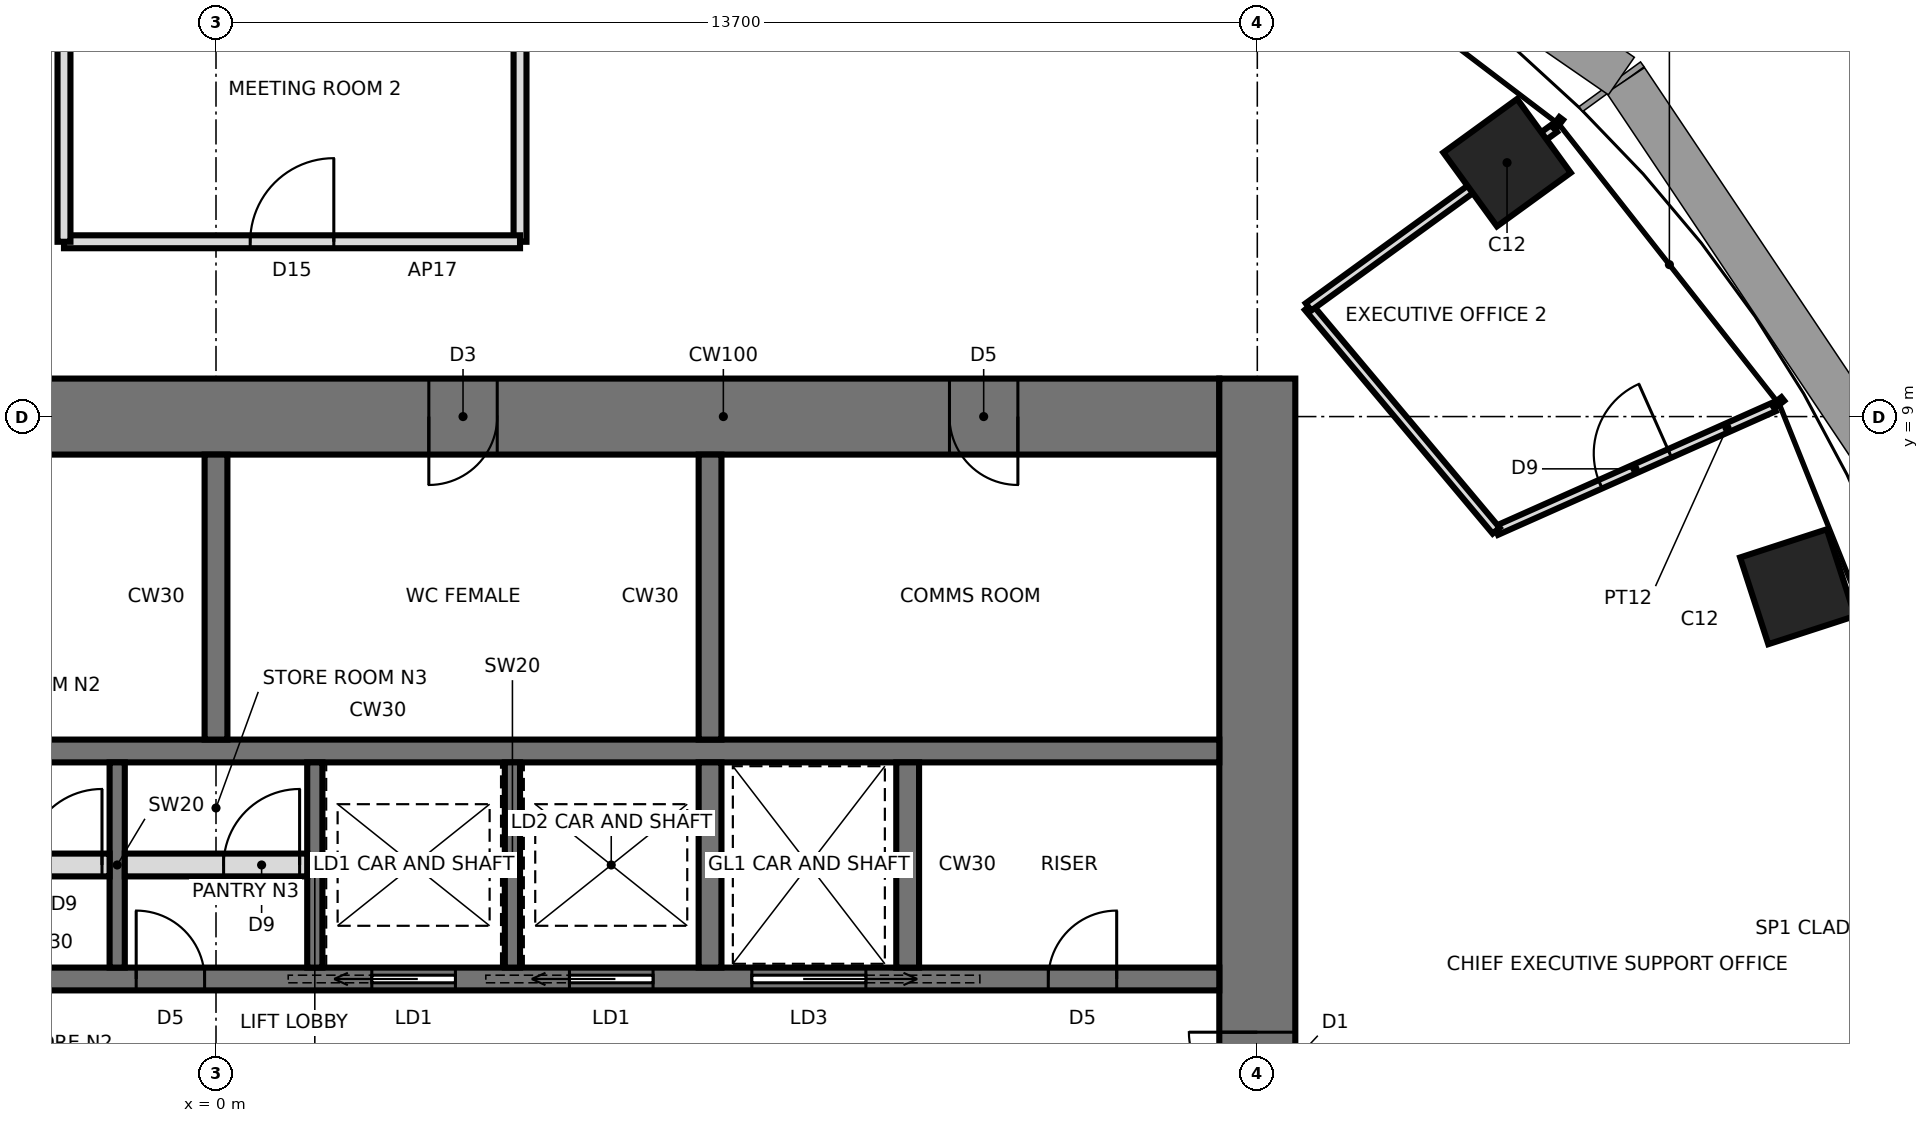
"""IFC4 building model, lengths in metres.
Left out: names, types, materials, properties, quantities, classifications, styles, units other than length and angle.
Written with IfcOpenShell. Run it as: python <this file> out.ifc"""

import sys

from ifc_helpers import new_model, si_unit, direction, frame, frame_2d, origin, origin_2d, place, context, subcontext, project, spatial, rectangle, extrude, element, fill, save


model = new_model("IFC4")
c1 = context("Model", 3, precision=1e-05, world=origin(), true_north=direction((0.0, 1.0)))
c2 = subcontext(c1, "Body", "Model", "MODEL_VIEW")
j1 = project(units=[si_unit("LENGTHUNIT", "METRE"), si_unit("PLANEANGLEUNIT", "RADIAN")], contexts=[c1])
p1 = place(None, origin())
s1 = spatial("IfcSite", under=j1, at=p1, CompositionType="ELEMENT")
p2 = place(p1, origin())
s2 = spatial("IfcBuilding", under=s1, at=p2, CompositionType="ELEMENT")
p3 = place(p2, frame((0.0, 0.0, 264.4)))
s3 = spatial("IfcBuildingStorey", under=s2, at=p3, CompositionType="ELEMENT", Elevation=264.4)
for number, where, z_axis, x_axis in (
    (1, (20.808, 6.761, 0.0), (0.0, 0.0, 1.0), (0.951, 0.309, 0.0)),
    (2, (16.986, 12.341, 0.0), (0.0, 0.0, 1.0), (0.809, 0.588, 0.0)),
):
    element("IfcColumn", number, at=place(p3, frame(where, z_axis=z_axis, x_axis=x_axis)), inside=s3, PredefinedType="COLUMN", context=c2, shape_type="SweptSolid", body=[
        extrude(rectangle(XDim=1.2, YDim=1.2, at=origin_2d()), origin(), (0.0, 0.0, 1.0), 4.2),
    ])
p4 = place(p3, frame((13.2, 9.0, 0.0), z_axis=(0.0, 0.0, 1.0), x_axis=(-1.0, 0.0, 0.0)))
e3 = element("IfcWall", 3, at=p4, inside=s3, PredefinedType="SHEAR", context=c2, shape_type="SweptSolid", body=[
    extrude(rectangle(XDim=26.4, YDim=1.0, at=frame_2d((13.2, 0.0))), origin(), (0.0, 0.0, 1.0), 4.2),
])
p5 = place(p4, frame((2.65, 0.0, 0.0)))
e4 = element("IfcOpeningElement", 4, at=p5, cuts=e3, PredefinedType="OPENING", context=c2, shape_type="SweptSolid", body=[
    extrude(rectangle(XDim=0.9, YDim=2.1, at=frame_2d((0.45, 1.05))), frame((0.0, 0.51, 0.0), z_axis=(0.0, -1.0, 0.0), x_axis=(1.0, 0.0, 0.0)), (0.0, 0.0, 1.0), 1.02),
])
p6 = place(p4, frame((9.5, 0.0, 0.0)))
e5 = element("IfcOpeningElement", 5, at=p6, cuts=e3, PredefinedType="OPENING", context=c2, shape_type="SweptSolid", body=[
    extrude(rectangle(XDim=0.9, YDim=2.1, at=frame_2d((0.45, 1.05))), frame((0.0, 0.51, 0.0), z_axis=(0.0, -1.0, 0.0), x_axis=(1.0, 0.0, 0.0)), (0.0, 0.0, 1.0), 1.02),
])
p7 = place(p4, frame((16.0, 0.0, 0.0)))
e6 = element("IfcOpeningElement", 6, at=p7, cuts=e3, PredefinedType="OPENING", context=c2, shape_type="SweptSolid", body=[
    extrude(rectangle(XDim=0.9, YDim=2.1, at=frame_2d((0.45, 1.05))), frame((0.0, 0.51, 0.0), z_axis=(0.0, -1.0, 0.0), x_axis=(1.0, 0.0, 0.0)), (0.0, 0.0, 1.0), 1.02),
])
p8 = place(p4, frame((21.25, 0.0, 0.0)))
e7 = element("IfcOpeningElement", 7, at=p8, cuts=e3, PredefinedType="OPENING", context=c2, shape_type="SweptSolid", body=[
    extrude(rectangle(XDim=0.9, YDim=2.1, at=frame_2d((0.45, 1.05))), frame((0.0, 0.51, 0.0), z_axis=(0.0, -1.0, 0.0), x_axis=(1.0, 0.0, 0.0)), (0.0, 0.0, 1.0), 1.02),
])
p9 = place(p4, frame((24.8, 0.0, 0.0)))
e8 = element("IfcOpeningElement", 8, at=p9, cuts=e3, PredefinedType="OPENING", context=c2, shape_type="SweptSolid", body=[
    extrude(rectangle(XDim=1.0, YDim=2.1, at=frame_2d((0.5, 1.05))), frame((0.0, 0.51, 0.0), z_axis=(0.0, -1.0, 0.0), x_axis=(1.0, 0.0, 0.0)), (0.0, 0.0, 1.0), 1.02),
])
p10 = place(p3, frame((13.7, -9.5, 0.0), z_axis=(0.0, 0.0, 1.0), x_axis=(0.0, 1.0, 0.0)))
e9 = element("IfcWall", 9, at=p10, inside=s3, PredefinedType="SHEAR", context=c2, shape_type="SweptSolid", body=[
    extrude(rectangle(XDim=19.0, YDim=1.0, at=frame_2d((9.5, 0.0))), origin(), (0.0, 0.0, 1.0), 4.2),
])
p11 = place(p10, frame((8.6, 0.0, 0.0)))
e10 = element("IfcOpeningElement", 10, at=p11, cuts=e9, PredefinedType="OPENING", context=c2, shape_type="SweptSolid", body=[
    extrude(rectangle(XDim=1.8, YDim=2.4, at=frame_2d((0.9, 1.2))), frame((0.0, 0.51, 0.0), z_axis=(0.0, -1.0, 0.0), x_axis=(1.0, 0.0, 0.0)), (0.0, 0.0, 1.0), 1.02),
])
p12 = place(p3, frame((-13.2, 1.6, 0.0), z_axis=(0.0, 0.0, 1.0), x_axis=(1.0, 0.0, 0.0)))
e11 = element("IfcWall", 11, at=p12, inside=s3, PredefinedType="SHEAR", context=c2, shape_type="SweptSolid", body=[
    extrude(rectangle(XDim=26.4, YDim=0.3, at=frame_2d((13.2, 0.0))), origin(), (0.0, 0.0, 1.0), 4.2),
])
p13 = place(p12, frame((0.25, 0.0, 0.0)))
e12 = element("IfcOpeningElement", 12, at=p13, cuts=e11, PredefinedType="OPENING", context=c2, shape_type="SweptSolid", body=[
    extrude(rectangle(XDim=1.0, YDim=2.1, at=frame_2d((0.5, 1.05))), frame((0.0, 0.16, 0.0), z_axis=(0.0, -1.0, 0.0), x_axis=(1.0, 0.0, 0.0)), (0.0, 0.0, 1.0), 0.32),
])
p14 = place(p12, frame((20.25, 0.0, 0.0)))
e13 = element("IfcOpeningElement", 13, at=p14, cuts=e11, PredefinedType="OPENING", context=c2, shape_type="SweptSolid", body=[
    extrude(rectangle(XDim=1.5, YDim=2.4, at=frame_2d((0.75, 1.2))), frame((0.0, 0.16, 0.0), z_axis=(0.0, -1.0, 0.0), x_axis=(1.0, 0.0, 0.0)), (0.0, 0.0, 1.0), 0.32),
])
p15 = place(p12, frame((7.55, 0.0, 0.0)))
e14 = element("IfcOpeningElement", 14, at=p15, cuts=e11, PredefinedType="OPENING", context=c2, shape_type="SweptSolid", body=[
    extrude(rectangle(XDim=0.9, YDim=2.1, at=frame_2d((0.45, 1.05))), frame((0.0, 0.16, 0.0), z_axis=(0.0, -1.0, 0.0), x_axis=(1.0, 0.0, 0.0)), (0.0, 0.0, 1.0), 0.32),
])
p16 = place(p12, frame((9.55, 0.0, 0.0)))
e15 = element("IfcOpeningElement", 15, at=p16, cuts=e11, PredefinedType="OPENING", context=c2, shape_type="SweptSolid", body=[
    extrude(rectangle(XDim=0.9, YDim=2.1, at=frame_2d((0.45, 1.05))), frame((0.0, 0.16, 0.0), z_axis=(0.0, -1.0, 0.0), x_axis=(1.0, 0.0, 0.0)), (0.0, 0.0, 1.0), 0.32),
])
p17 = place(p12, frame((12.15, 0.0, 0.0)))
e16 = element("IfcOpeningElement", 16, at=p17, cuts=e11, PredefinedType="OPENING", context=c2, shape_type="SweptSolid", body=[
    extrude(rectangle(XDim=0.9, YDim=2.1, at=frame_2d((0.45, 1.05))), frame((0.0, 0.16, 0.0), z_axis=(0.0, -1.0, 0.0), x_axis=(1.0, 0.0, 0.0)), (0.0, 0.0, 1.0), 0.32),
])
p18 = place(p12, frame((15.25, 0.0, 0.0)))
e17 = element("IfcOpeningElement", 17, at=p18, cuts=e11, PredefinedType="OPENING", context=c2, shape_type="SweptSolid", body=[
    extrude(rectangle(XDim=1.1, YDim=2.3, at=frame_2d((0.55, 1.15))), frame((0.0, 0.16, 0.0), z_axis=(0.0, -1.0, 0.0), x_axis=(1.0, 0.0, 0.0)), (0.0, 0.0, 1.0), 0.32),
])
p19 = place(p12, frame((17.85, 0.0, 0.0)))
e18 = element("IfcOpeningElement", 18, at=p19, cuts=e11, PredefinedType="OPENING", context=c2, shape_type="SweptSolid", body=[
    extrude(rectangle(XDim=1.1, YDim=2.3, at=frame_2d((0.55, 1.15))), frame((0.0, 0.16, 0.0), z_axis=(0.0, -1.0, 0.0), x_axis=(1.0, 0.0, 0.0)), (0.0, 0.0, 1.0), 0.32),
])
p20 = place(p12, frame((24.15, 0.0, 0.0)))
e19 = element("IfcOpeningElement", 19, at=p20, cuts=e11, PredefinedType="OPENING", context=c2, shape_type="SweptSolid", body=[
    extrude(rectangle(XDim=0.9, YDim=2.1, at=frame_2d((0.45, 1.05))), frame((0.0, 0.16, 0.0), z_axis=(0.0, -1.0, 0.0), x_axis=(1.0, 0.0, 0.0)), (0.0, 0.0, 1.0), 0.32),
])
p21 = place(p3, frame((-13.2, 4.6, 0.0), z_axis=(0.0, 0.0, 1.0), x_axis=(1.0, 0.0, 0.0)))
e20 = element("IfcWall", 20, at=p21, inside=s3, PredefinedType="SHEAR", context=c2, shape_type="SweptSolid", body=[
    extrude(rectangle(XDim=26.4, YDim=0.3, at=frame_2d((13.2, 0.0))), origin(), (0.0, 0.0, 1.0), 4.2),
])
p22 = place(p3, frame((6.5, 1.75, 0.0), z_axis=(0.0, 0.0, 1.0), x_axis=(0.0, 1.0, 0.0)))
e21 = element("IfcWall", 21, at=p22, inside=s3, PredefinedType="SHEAR", context=c2, shape_type="SweptSolid", body=[
    extrude(rectangle(XDim=2.7, YDim=0.3, at=frame_2d((1.35, 0.0))), origin(), (0.0, 0.0, 1.0), 4.2),
])
p23 = place(p3, frame((6.5, 4.75, 0.0), z_axis=(0.0, 0.0, 1.0), x_axis=(0.0, 1.0, 0.0)))
e22 = element("IfcWall", 22, at=p23, inside=s3, PredefinedType="SHEAR", context=c2, shape_type="SweptSolid", body=[
    extrude(rectangle(XDim=3.75, YDim=0.3, at=frame_2d((1.875, 0.0))), origin(), (0.0, 0.0, 1.0), 4.2),
])
for number, where, z_axis, x_axis in (
    (23, (-1.3, 1.75, 0.0), (0.0, 0.0, 1.0), (0.0, 1.0, 0.0)),
    (24, (1.3, 1.75, 0.0), (0.0, 0.0, 1.0), (0.0, 1.0, 0.0)),
    (25, (3.9, 1.75, 0.0), (0.0, 0.0, 1.0), (0.0, 1.0, 0.0)),
):
    element("IfcWall", number, at=place(p3, frame(where, z_axis=z_axis, x_axis=x_axis)), inside=s3, PredefinedType="SHEAR", context=c2, shape_type="SweptSolid", body=[
        extrude(rectangle(XDim=2.7, YDim=0.2, at=frame_2d((1.35, 0.0))), origin(), (0.0, 0.0, 1.0), 4.2),
    ])
p24 = place(p3, frame((0.0, 4.75, 0.0), z_axis=(0.0, 0.0, 1.0), x_axis=(0.0, 1.0, 0.0)))
e26 = element("IfcWall", 26, at=p24, inside=s3, PredefinedType="SHEAR", context=c2, shape_type="SweptSolid", body=[
    extrude(rectangle(XDim=3.75, YDim=0.3, at=frame_2d((1.875, 0.0))), origin(), (0.0, 0.0, 1.0), 4.2),
])
p25 = place(p3, frame((9.1, 1.75, 0.0), z_axis=(0.0, 0.0, 1.0), x_axis=(0.0, 1.0, 0.0)))
e27 = element("IfcWall", 27, at=p25, inside=s3, PredefinedType="SHEAR", context=c2, shape_type="SweptSolid", body=[
    extrude(rectangle(XDim=2.7, YDim=0.3, at=frame_2d((1.35, 0.0))), origin(), (0.0, 0.0, 1.0), 4.2),
])
p26 = place(p3, frame((-3.8, 3.1, 0.0), z_axis=(0.0, 0.0, 1.0), x_axis=(1.0, 0.0, 0.0)))
e28 = element("IfcWall", 28, at=p26, inside=s3, PredefinedType="PARTITIONING", context=c2, shape_type="SweptSolid", body=[
    extrude(rectangle(XDim=2.4, YDim=0.3, at=frame_2d((1.2, 0.0))), origin(), (0.0, 0.0, 1.0), 4.04),
])
p27 = place(p26, frame((1.3, 0.0, 0.0)))
e29 = element("IfcOpeningElement", 29, at=p27, cuts=e28, PredefinedType="OPENING", context=c2, shape_type="SweptSolid", body=[
    extrude(rectangle(XDim=1.0, YDim=2.4, at=frame_2d((0.5, 1.2))), frame((0.0, 0.16, 0.0), z_axis=(0.0, -1.0, 0.0), x_axis=(1.0, 0.0, 0.0)), (0.0, 0.0, 1.0), 0.32),
])
p28 = place(p3, frame((-1.2, 3.1, 0.0), z_axis=(0.0, 0.0, 1.0), x_axis=(1.0, 0.0, 0.0)))
e30 = element("IfcWall", 30, at=p28, inside=s3, PredefinedType="PARTITIONING", context=c2, shape_type="SweptSolid", body=[
    extrude(rectangle(XDim=2.4, YDim=0.3, at=frame_2d((1.2, 0.0))), origin(), (0.0, 0.0, 1.0), 4.04),
])
p29 = place(p28, frame((1.3, 0.0, 0.0)))
e31 = element("IfcOpeningElement", 31, at=p29, cuts=e30, PredefinedType="OPENING", context=c2, shape_type="SweptSolid", body=[
    extrude(rectangle(XDim=1.0, YDim=2.4, at=frame_2d((0.5, 1.2))), frame((0.0, 0.16, 0.0), z_axis=(0.0, -1.0, 0.0), x_axis=(1.0, 0.0, 0.0)), (0.0, 0.0, 1.0), 0.32),
])
p30 = place(p3, frame((16.842, 7.499, 0.0), z_axis=(0.0, 0.0, 1.0), x_axis=(0.913549606868, 0.406727323635, 0.0)))
e32 = element("IfcWall", 32, at=p30, inside=s3, PredefinedType="PARTITIONING", context=c2, shape_type="SweptSolid", body=[
    extrude(rectangle(XDim=4.0, YDim=0.12, at=frame_2d((2.0, 0.0))), origin(), (0.0, 0.0, 1.0), 4.04),
])
p31 = place(p30, frame((1.5, 0.0, 0.0)))
e33 = element("IfcOpeningElement", 33, at=p31, cuts=e32, PredefinedType="OPENING", context=c2, shape_type="SweptSolid", body=[
    extrude(rectangle(XDim=1.0, YDim=2.4, at=frame_2d((0.5, 1.2))), frame((0.0, 0.07, 0.0), z_axis=(0.0, -1.0, 0.0), x_axis=(1.0, 0.0, 0.0)), (0.0, 0.0, 1.0), 0.14),
])
p32 = place(p3, frame((14.373, 10.442, 0.0), z_axis=(0.0, 0.0, 1.0), x_axis=(0.642749419025, -0.766076487267, 0.0)))
e34 = element("IfcWall", 34, at=p32, inside=s3, PredefinedType="PARTITIONING", context=c2, shape_type="SweptSolid", body=[
    extrude(rectangle(XDim=3.843, YDim=0.12, at=frame_2d((1.921, 0.0))), origin(), (0.0, 0.0, 1.0), 4.04),
])
p33 = place(p3, frame((17.609, 12.793, 0.0), z_axis=(0.0, 0.0, 1.0), x_axis=(-0.809026317077, -0.587772420479, 0.0)))
e35 = element("IfcWall", 35, at=p33, inside=s3, PredefinedType="PARTITIONING", context=c2, shape_type="SweptSolid", body=[
    extrude(rectangle(XDim=4.0, YDim=0.12, at=frame_2d((2.0, 0.0))), origin(), (0.0, 0.0, 1.0), 3.24),
])
p34 = place(p3, frame((4.0, 15.3, 0.0), z_axis=(0.0, 0.0, 1.0), x_axis=(0.0, -1.0, 0.0)))
e36 = element("IfcWall", 36, at=p34, inside=s3, PredefinedType="PARTITIONING", context=c2, shape_type="SweptSolid", body=[
    extrude(rectangle(XDim=4.0, YDim=0.17, at=frame_2d((2.0, 0.0))), origin(), (0.0, 0.0, 1.0), 4.04),
])
p35 = place(p3, frame((4.0, 11.3, 0.0), z_axis=(0.0, 0.0, 1.0), x_axis=(-1.0, 0.0, 0.0)))
e37 = element("IfcWall", 37, at=p35, inside=s3, PredefinedType="PARTITIONING", context=c2, shape_type="SweptSolid", body=[
    extrude(rectangle(XDim=6.0, YDim=0.17, at=frame_2d((3.0, 0.0))), origin(), (0.0, 0.0, 1.0), 4.04),
])
p36 = place(p35, frame((2.45, 0.0, 0.0)))
e38 = element("IfcOpeningElement", 38, at=p36, cuts=e37, PredefinedType="OPENING", context=c2, shape_type="SweptSolid", body=[
    extrude(rectangle(XDim=1.1, YDim=2.4, at=frame_2d((0.55, 1.2))), frame((0.0, 0.095, 0.0), z_axis=(0.0, -1.0, 0.0), x_axis=(1.0, 0.0, 0.0)), (0.0, 0.0, 1.0), 0.19),
])
p37 = place(p3, frame((-2.0, 11.3, 0.0), z_axis=(0.0, 0.0, 1.0), x_axis=(0.0, 1.0, 0.0)))
e39 = element("IfcWall", 39, at=p37, inside=s3, PredefinedType="PARTITIONING", context=c2, shape_type="SweptSolid", body=[
    extrude(rectangle(XDim=4.0, YDim=0.17, at=frame_2d((2.0, 0.0))), origin(), (0.0, 0.0, 1.0), 4.04),
])
p38 = place(p11, origin())
e40 = element("IfcDoor", 40, at=p38, inside=s3, OperationType="DOUBLE_DOOR_SINGLE_SWING", PredefinedType="DOOR", context=c2, shape_type="SweptSolid", body=[
    extrude(rectangle(XDim=1.72, YDim=2.36, at=frame_2d((0.9, 1.18))), frame((0.0, 0.025, 0.0), z_axis=(0.0, -1.0, 0.0), x_axis=(1.0, 0.0, 0.0)), (0.0, 0.0, 1.0), 0.05),
    extrude(rectangle(XDim=0.04, YDim=2.4, at=frame_2d((0.02, 1.2))), frame((0.0, 0.25, 0.0), z_axis=(0.0, -1.0, 0.0), x_axis=(1.0, 0.0, 0.0)), (0.0, 0.0, 1.0), 0.5),
    extrude(rectangle(XDim=0.04, YDim=2.4, at=frame_2d((1.78, 1.2))), frame((0.0, 0.25, 0.0), z_axis=(0.0, -1.0, 0.0), x_axis=(1.0, 0.0, 0.0)), (0.0, 0.0, 1.0), 0.5),
    extrude(rectangle(XDim=1.72, YDim=0.04, at=frame_2d((0.9, 2.38))), frame((0.0, 0.25, 0.0), z_axis=(0.0, -1.0, 0.0), x_axis=(1.0, 0.0, 0.0)), (0.0, 0.0, 1.0), 0.5),
])
fill(e10, e40)
p39 = place(p14, origin())
e41 = element("IfcDoor", 41, at=p39, inside=s3, OperationType="SLIDING_TO_RIGHT", PredefinedType="DOOR", context=c2, shape_type="SweptSolid", body=[
    extrude(rectangle(XDim=1.5, YDim=2.4, at=frame_2d((0.75, 1.2))), frame((0.0, 0.025, 0.0), z_axis=(0.0, -1.0, 0.0), x_axis=(1.0, 0.0, 0.0)), (0.0, 0.0, 1.0), 0.05),
])
fill(e13, e41)
p40 = place(p27, origin())
e42 = element("IfcDoor", 42, at=p40, inside=s3, OperationType="SINGLE_SWING_RIGHT", PredefinedType="DOOR", context=c2, shape_type="SweptSolid", body=[
    extrude(rectangle(XDim=1.0, YDim=2.4, at=frame_2d((0.5, 1.2))), frame((0.0, 0.025, 0.0), z_axis=(0.0, -1.0, 0.0), x_axis=(1.0, 0.0, 0.0)), (0.0, 0.0, 1.0), 0.05),
])
fill(e29, e42)
p41 = place(p29, origin())
e43 = element("IfcDoor", 43, at=p41, inside=s3, OperationType="SINGLE_SWING_RIGHT", PredefinedType="DOOR", context=c2, shape_type="SweptSolid", body=[
    extrude(rectangle(XDim=1.0, YDim=2.4, at=frame_2d((0.5, 1.2))), frame((0.0, 0.025, 0.0), z_axis=(0.0, -1.0, 0.0), x_axis=(1.0, 0.0, 0.0)), (0.0, 0.0, 1.0), 0.05),
])
fill(e31, e43)
p42 = place(p17, origin())
e44 = element("IfcDoor", 44, at=p42, inside=s3, OperationType="SINGLE_SWING_LEFT", PredefinedType="DOOR", context=c2, shape_type="SweptSolid", body=[
    extrude(rectangle(XDim=0.9, YDim=2.1, at=frame_2d((0.45, 1.05))), frame((0.0, 0.025, 0.0), z_axis=(0.0, -1.0, 0.0), x_axis=(1.0, 0.0, 0.0)), (0.0, 0.0, 1.0), 0.05),
])
fill(e16, e44)
p43 = place(p18, origin())
e45 = element("IfcDoor", 45, at=p43, inside=s3, OperationType="SLIDING_TO_LEFT", PredefinedType="DOOR", context=c2, shape_type="SweptSolid", body=[
    extrude(rectangle(XDim=1.1, YDim=2.3, at=frame_2d((0.55, 1.15))), frame((0.0, 0.025, 0.0), z_axis=(0.0, -1.0, 0.0), x_axis=(1.0, 0.0, 0.0)), (0.0, 0.0, 1.0), 0.05),
])
fill(e17, e45)
p44 = place(p19, origin())
e46 = element("IfcDoor", 46, at=p44, inside=s3, OperationType="SLIDING_TO_LEFT", PredefinedType="DOOR", context=c2, shape_type="SweptSolid", body=[
    extrude(rectangle(XDim=1.1, YDim=2.3, at=frame_2d((0.55, 1.15))), frame((0.0, 0.025, 0.0), z_axis=(0.0, -1.0, 0.0), x_axis=(1.0, 0.0, 0.0)), (0.0, 0.0, 1.0), 0.05),
])
fill(e18, e46)
p45 = place(p20, origin())
e47 = element("IfcDoor", 47, at=p45, inside=s3, OperationType="SINGLE_SWING_RIGHT", PredefinedType="DOOR", context=c2, shape_type="SweptSolid", body=[
    extrude(rectangle(XDim=0.9, YDim=2.1, at=frame_2d((0.45, 1.05))), frame((0.0, 0.025, 0.0), z_axis=(0.0, -1.0, 0.0), x_axis=(1.0, 0.0, 0.0)), (0.0, 0.0, 1.0), 0.05),
])
fill(e19, e47)
p46 = place(p5, origin())
e48 = element("IfcDoor", 48, at=p46, inside=s3, OperationType="SINGLE_SWING_LEFT", PredefinedType="DOOR", context=c2, shape_type="SweptSolid", body=[
    extrude(rectangle(XDim=0.82, YDim=2.06, at=frame_2d((0.45, 1.03))), frame((0.0, 0.025, 0.0), z_axis=(0.0, -1.0, 0.0), x_axis=(1.0, 0.0, 0.0)), (0.0, 0.0, 1.0), 0.05),
    extrude(rectangle(XDim=0.04, YDim=2.1, at=frame_2d((0.02, 1.05))), frame((0.0, 0.25, 0.0), z_axis=(0.0, -1.0, 0.0), x_axis=(1.0, 0.0, 0.0)), (0.0, 0.0, 1.0), 0.5),
    extrude(rectangle(XDim=0.04, YDim=2.1, at=frame_2d((0.88, 1.05))), frame((0.0, 0.25, 0.0), z_axis=(0.0, -1.0, 0.0), x_axis=(1.0, 0.0, 0.0)), (0.0, 0.0, 1.0), 0.5),
    extrude(rectangle(XDim=0.82, YDim=0.04, at=frame_2d((0.45, 2.08))), frame((0.0, 0.25, 0.0), z_axis=(0.0, -1.0, 0.0), x_axis=(1.0, 0.0, 0.0)), (0.0, 0.0, 1.0), 0.5),
])
fill(e4, e48)
p47 = place(p6, origin())
e49 = element("IfcDoor", 49, at=p47, inside=s3, OperationType="SINGLE_SWING_RIGHT", PredefinedType="DOOR", context=c2, shape_type="SweptSolid", body=[
    extrude(rectangle(XDim=0.82, YDim=2.06, at=frame_2d((0.45, 1.03))), frame((0.0, 0.025, 0.0), z_axis=(0.0, -1.0, 0.0), x_axis=(1.0, 0.0, 0.0)), (0.0, 0.0, 1.0), 0.05),
    extrude(rectangle(XDim=0.04, YDim=2.1, at=frame_2d((0.02, 1.05))), frame((0.0, 0.25, 0.0), z_axis=(0.0, -1.0, 0.0), x_axis=(1.0, 0.0, 0.0)), (0.0, 0.0, 1.0), 0.5),
    extrude(rectangle(XDim=0.04, YDim=2.1, at=frame_2d((0.88, 1.05))), frame((0.0, 0.25, 0.0), z_axis=(0.0, -1.0, 0.0), x_axis=(1.0, 0.0, 0.0)), (0.0, 0.0, 1.0), 0.5),
    extrude(rectangle(XDim=0.82, YDim=0.04, at=frame_2d((0.45, 2.08))), frame((0.0, 0.25, 0.0), z_axis=(0.0, -1.0, 0.0), x_axis=(1.0, 0.0, 0.0)), (0.0, 0.0, 1.0), 0.5),
])
fill(e5, e49)
p48 = place(p31, origin())
e50 = element("IfcDoor", 50, at=p48, inside=s3, OperationType="SINGLE_SWING_RIGHT", PredefinedType="DOOR", context=c2, shape_type="SweptSolid", body=[
    extrude(rectangle(XDim=1.0, YDim=2.4, at=frame_2d((0.5, 1.2))), frame((0.0, 0.025, 0.0), z_axis=(0.0, -1.0, 0.0), x_axis=(1.0, 0.0, 0.0)), (0.0, 0.0, 1.0), 0.05),
])
fill(e33, e50)
p49 = place(p36, frame((1.1, 0.0, 0.0), z_axis=(0.0, 0.0, 1.0), x_axis=(-1.0, 0.0, 0.0)))
e51 = element("IfcDoor", 51, at=p49, inside=s3, OperationType="SINGLE_SWING_RIGHT", PredefinedType="DOOR", context=c2, shape_type="SweptSolid", body=[
    extrude(rectangle(XDim=1.1, YDim=2.4, at=frame_2d((0.55, 1.2))), frame((0.0, 0.025, 0.0), z_axis=(0.0, -1.0, 0.0), x_axis=(1.0, 0.0, 0.0)), (0.0, 0.0, 1.0), 0.05),
])
fill(e38, e51)
save(model, sys.argv[1])
